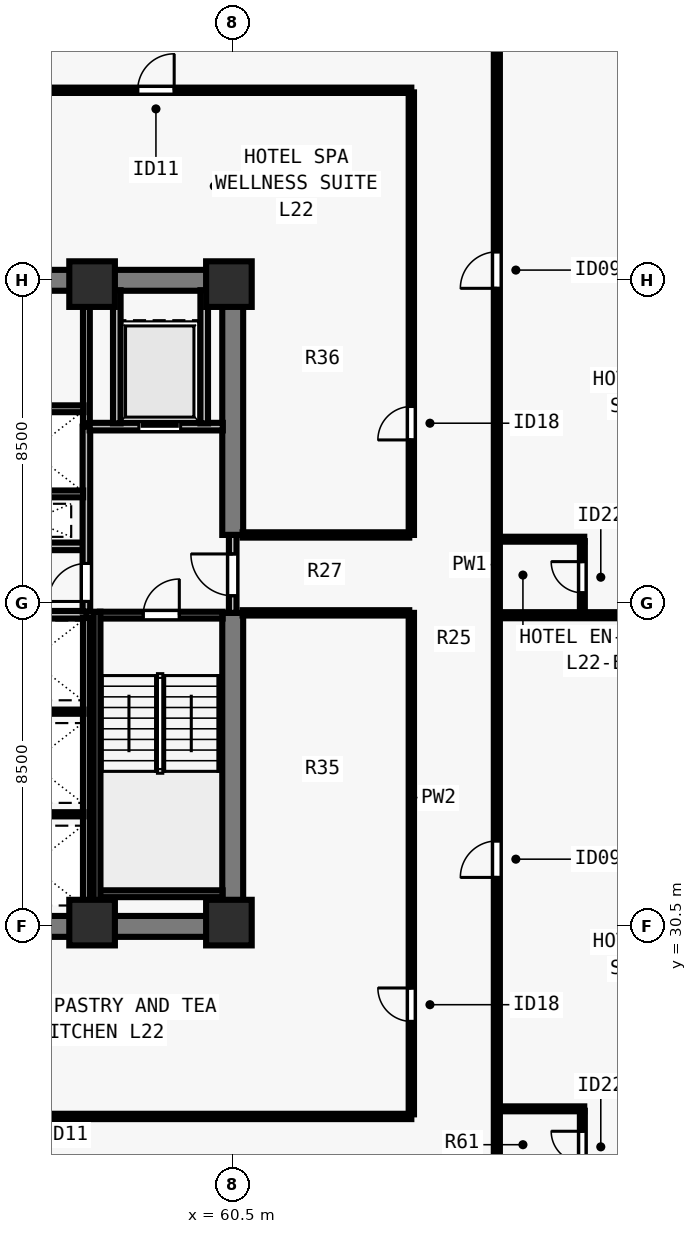
"""IFC4 building model, lengths in metres.
Left out: names, types, materials, properties, quantities, classifications, styles, units other than length and angle.
Written with IfcOpenShell. Run it as: python <this file> out.ifc"""

import sys

from ifc_helpers import new_model, si_unit, direction, frame, frame_2d, origin, origin_2d, place, context, subcontext, project, spatial, rectangle, extrude, element, fill, save


model = new_model("IFC4")
c1 = context("Model", 3, precision=1e-05, world=origin(), true_north=direction((0.0, 1.0)))
c2 = subcontext(c1, "Body", "Model", "MODEL_VIEW")
j1 = project(units=[si_unit("LENGTHUNIT", "METRE"), si_unit("PLANEANGLEUNIT", "RADIAN")], contexts=[c1])
p1 = place(None, origin())
s1 = spatial("IfcSite", under=j1, at=p1, CompositionType="ELEMENT")
p2 = place(p1, origin())
s2 = spatial("IfcBuilding", under=s1, at=p2, CompositionType="ELEMENT")
p3 = place(p2, frame((0.0, 0.0, 83.0)))
s3 = spatial("IfcBuildingStorey", under=s2, at=p3, CompositionType="ELEMENT", Elevation=83.0)
for number, where, z_axis, x_axis in (
    (1, (56.8, 30.6, 0.0), (0.0, 0.0, 1.0), (1.0, 0.0, 0.0)),
    (2, (60.4, 30.6, 0.0), (0.0, 0.0, 1.0), (1.0, 0.0, 0.0)),
    (3, (56.8, 47.4, 0.0), (0.0, 0.0, 1.0), (1.0, 0.0, 0.0)),
    (4, (60.4, 47.4, 0.0), (0.0, 0.0, 1.0), (1.0, 0.0, 0.0)),
):
    element("IfcColumn", number, at=place(p3, frame(where, z_axis=z_axis, x_axis=x_axis)), inside=s3, PredefinedType="COLUMN", context=c2, shape_type="SweptSolid", body=[
        extrude(rectangle(XDim=1.2, YDim=1.2, at=origin_2d()), origin(), (0.0, 0.0, 1.0), 3.5),
    ])
for number, where, z_axis, x_axis in (
    (5, (43.225, 30.5, 0.0), (0.0, 0.0, 1.0), (1.0, 0.0, 0.0)),
    (6, (43.225, 47.5, 0.0), (0.0, 0.0, 1.0), (1.0, 0.0, 0.0)),
):
    element("IfcWall", number, at=place(p3, frame(where, z_axis=z_axis, x_axis=x_axis)), inside=s3, PredefinedType="SHEAR", context=c2, shape_type="SweptSolid", body=[
        extrude(rectangle(XDim=17.55, YDim=0.55, at=frame_2d((8.775, 0.0))), origin(), (0.0, 0.0, 1.0), 3.28),
    ])
p4 = place(p3, frame((60.5, 30.765, 0.0), z_axis=(0.0, 0.0, 1.0), x_axis=(0.0, 1.0, 0.0)))
e7 = element("IfcWall", 7, at=p4, inside=s3, PredefinedType="SHEAR", context=c2, shape_type="SweptSolid", body=[
    extrude(rectangle(XDim=7.985, YDim=0.55, at=frame_2d((3.993, 0.0))), origin(), (0.0, 0.0, 1.0), 3.28),
])
p5 = place(p3, frame((60.5, 40.8, 0.0), z_axis=(0.0, 0.0, 1.0), x_axis=(0.0, 1.0, 0.0)))
e8 = element("IfcWall", 8, at=p5, inside=s3, PredefinedType="SHEAR", context=c2, shape_type="SweptSolid", body=[
    extrude(rectangle(XDim=6.435, YDim=0.55, at=frame_2d((3.218, 0.0))), origin(), (0.0, 0.0, 1.0), 3.28),
])
for number, where, z_axis, x_axis in (
    (9, (53.7, 38.7, 0.0), (0.0, 0.0, 1.0), (1.0, 0.0, 0.0)),
    (10, (53.7, 40.5, 0.0), (0.0, 0.0, 1.0), (1.0, 0.0, 0.0)),
):
    element("IfcWall", number, at=place(p3, frame(where, z_axis=z_axis, x_axis=x_axis)), inside=s3, PredefinedType="SOLIDWALL", context=c2, shape_type="SweptSolid", body=[
        extrude(rectangle(XDim=2.95, YDim=0.2, at=frame_2d((1.475, 0.0))), origin(), (0.0, 0.0, 1.0), 3.28),
    ])
p6 = place(p3, frame((60.5, 38.75, 0.0), z_axis=(0.0, 0.0, 1.0), x_axis=(0.0, 1.0, 0.0)))
e11 = element("IfcWall", 11, at=p6, inside=s3, PredefinedType="SOLIDWALL", context=c2, shape_type="SweptSolid", body=[
    extrude(rectangle(XDim=2.05, YDim=0.2, at=frame_2d((1.025, 0.0))), origin(), (0.0, 0.0, 1.0), 3.28),
])
p7 = place(p6, frame((0.45, 0.0, 0.0)))
e12 = element("IfcOpeningElement", 12, at=p7, cuts=e11, PredefinedType="OPENING", context=c2, shape_type="SweptSolid", body=[
    extrude(rectangle(XDim=1.1, YDim=2.15, at=frame_2d((0.55, 1.075))), frame((0.0, 0.11, 0.0), z_axis=(0.0, -1.0, 0.0), x_axis=(1.0, 0.0, 0.0)), (0.0, 0.0, 1.0), 0.22),
])
p8 = place(p3, frame((56.65, 38.785, 0.0), z_axis=(0.0, 0.0, 1.0), x_axis=(0.0, 1.0, 0.0)))
e13 = element("IfcWall", 13, at=p8, inside=s3, PredefinedType="SOLIDWALL", context=c2, shape_type="SweptSolid", body=[
    extrude(rectangle(XDim=4.865, YDim=0.2, at=frame_2d((2.433, 0.0))), origin(), (0.0, 0.0, 1.0), 3.28),
])
p9 = place(p8, frame((0.265, 0.0, 0.0)))
e14 = element("IfcOpeningElement", 14, at=p9, cuts=e13, PredefinedType="OPENING", context=c2, shape_type="SweptSolid", body=[
    extrude(rectangle(XDim=1.0, YDim=2.15, at=frame_2d((0.5, 1.075))), frame((0.0, 0.11, 0.0), z_axis=(0.0, -1.0, 0.0), x_axis=(1.0, 0.0, 0.0)), (0.0, 0.0, 1.0), 0.22),
])
p10 = place(p3, frame((56.735, 43.65, 0.0), z_axis=(0.0, 0.0, 1.0), x_axis=(1.0, 0.0, 0.0)))
e15 = element("IfcWall", 15, at=p10, inside=s3, PredefinedType="SOLIDWALL", context=c2, shape_type="SweptSolid", body=[
    extrude(rectangle(XDim=3.505, YDim=0.2, at=frame_2d((1.752, 0.0))), origin(), (0.0, 0.0, 1.0), 3.28),
])
p11 = place(p10, frame((1.295, 0.0, 0.0)))
e16 = element("IfcOpeningElement", 16, at=p11, cuts=e15, PredefinedType="OPENING", context=c2, shape_type="SweptSolid", body=[
    extrude(rectangle(XDim=1.1, YDim=2.2, at=frame_2d((0.55, 1.1))), frame((0.0, 0.11, 0.0), z_axis=(0.0, -1.0, 0.0), x_axis=(1.0, 0.0, 0.0)), (0.0, 0.0, 1.0), 0.22),
])
for number, where, z_axis, x_axis in (
    (17, (57.45, 43.735, 0.0), (0.0, 0.0, 1.0), (0.0, 1.0, 0.0)),
    (18, (59.75, 43.735, 0.0), (0.0, 0.0, 1.0), (0.0, 1.0, 0.0)),
):
    element("IfcWall", number, at=place(p3, frame(where, z_axis=z_axis, x_axis=x_axis)), inside=s3, PredefinedType="SOLIDWALL", context=c2, shape_type="SweptSolid", body=[
        extrude(rectangle(XDim=3.505, YDim=0.2, at=frame_2d((1.752, 0.0))), origin(), (0.0, 0.0, 1.0), 3.28),
    ])
p12 = place(p3, frame((56.65, 30.76, 0.0), z_axis=(0.0, 0.0, 1.0), x_axis=(0.0, 1.0, 0.0)))
e19 = element("IfcWall", 19, at=p12, inside=s3, PredefinedType="SOLIDWALL", context=c2, shape_type="SweptSolid", body=[
    extrude(rectangle(XDim=7.855, YDim=0.18, at=frame_2d((3.927, 0.0))), origin(), (0.0, 0.0, 1.0), 3.28),
])
for number, where, z_axis, x_axis in (
    (20, (53.785, 33.45, 0.0), (0.0, 0.0, 1.0), (1.0, 0.0, 0.0)),
    (21, (53.785, 36.15, 0.0), (0.0, 0.0, 1.0), (1.0, 0.0, 0.0)),
):
    element("IfcWall", number, at=place(p3, frame(where, z_axis=z_axis, x_axis=x_axis)), inside=s3, PredefinedType="PARTITIONING", context=c2, shape_type="SweptSolid", body=[
        extrude(rectangle(XDim=2.79, YDim=0.11, at=frame_2d((1.395, 0.0))), origin(), (0.0, 0.0, 1.0), 3.28),
    ])
p13 = place(p3, frame((56.65, 43.735, 0.0), z_axis=(0.0, 0.0, 1.0), x_axis=(0.0, 1.0, 0.0)))
e22 = element("IfcWall", 22, at=p13, inside=s3, PredefinedType="SOLIDWALL", context=c2, shape_type="SweptSolid", body=[
    extrude(rectangle(XDim=3.505, YDim=0.18, at=frame_2d((1.752, 0.0))), origin(), (0.0, 0.0, 1.0), 3.28),
])
p14 = place(p3, frame((53.785, 41.88, 0.0), z_axis=(0.0, 0.0, 1.0), x_axis=(1.0, 0.0, 0.0)))
e23 = element("IfcWall", 23, at=p14, inside=s3, PredefinedType="SOLIDWALL", context=c2, shape_type="SweptSolid", body=[
    extrude(rectangle(XDim=2.78, YDim=0.18, at=frame_2d((1.39, 0.0))), origin(), (0.0, 0.0, 1.0), 3.28),
])
p15 = place(p3, frame((53.785, 44.12, 0.0), z_axis=(0.0, 0.0, 1.0), x_axis=(1.0, 0.0, 0.0)))
e24 = element("IfcWall", 24, at=p15, inside=s3, PredefinedType="SOLIDWALL", context=c2, shape_type="SweptSolid", body=[
    extrude(rectangle(XDim=2.79, YDim=0.18, at=frame_2d((1.395, 0.0))), origin(), (0.0, 0.0, 1.0), 3.28),
])
p16 = place(p3, frame((67.45, 23.315, 0.0), z_axis=(0.0, 0.0, 1.0), x_axis=(0.0, 1.0, 0.0)))
e25 = element("IfcWall", 25, at=p16, inside=s3, PredefinedType="PARTITIONING", context=c2, shape_type="SweptSolid", body=[
    extrude(rectangle(XDim=31.37, YDim=0.16, at=frame_2d((15.685, 0.0))), origin(), (0.0, 0.0, 1.0), 3.28),
])
p17 = place(p16, frame((8.474, 0.0, 0.0)))
e26 = element("IfcOpeningElement", 26, at=p17, cuts=e25, PredefinedType="OPENING", context=c2, shape_type="SweptSolid", body=[
    extrude(rectangle(XDim=0.96, YDim=2.15, at=frame_2d((0.48, 1.075))), frame((0.0, 0.09, 0.0), z_axis=(0.0, -1.0, 0.0), x_axis=(1.0, 0.0, 0.0)), (0.0, 0.0, 1.0), 0.18),
])
p18 = place(p16, frame((23.974, 0.0, 0.0)))
e27 = element("IfcOpeningElement", 27, at=p18, cuts=e25, PredefinedType="OPENING", context=c2, shape_type="SweptSolid", body=[
    extrude(rectangle(XDim=0.96, YDim=2.15, at=frame_2d((0.48, 1.075))), frame((0.0, 0.09, 0.0), z_axis=(0.0, -1.0, 0.0), x_axis=(1.0, 0.0, 0.0)), (0.0, 0.0, 1.0), 0.18),
])
p19 = place(p3, frame((38.8, 25.5, 0.0), z_axis=(0.0, 0.0, 1.0), x_axis=(1.0, 0.0, 0.0)))
e28 = element("IfcWall", 28, at=p19, inside=s3, PredefinedType="PARTITIONING", context=c2, shape_type="SweptSolid", body=[
    extrude(rectangle(XDim=26.4, YDim=0.14, at=frame_2d((13.2, 0.0))), origin(), (0.0, 0.0, 1.0), 3.28),
])
p20 = place(p19, frame((2.2, 0.0, 0.0)))
e29 = element("IfcOpeningElement", 29, at=p20, cuts=e28, PredefinedType="OPENING", context=c2, shape_type="SweptSolid", body=[
    extrude(rectangle(XDim=0.96, YDim=2.12, at=frame_2d((0.48, 1.06))), frame((0.0, 0.08, 0.0), z_axis=(0.0, -1.0, 0.0), x_axis=(1.0, 0.0, 0.0)), (0.0, 0.0, 1.0), 0.16),
])
p21 = place(p19, frame((15.2, 0.0, 0.0)))
e30 = element("IfcOpeningElement", 30, at=p21, cuts=e28, PredefinedType="OPENING", context=c2, shape_type="SweptSolid", body=[
    extrude(rectangle(XDim=0.96, YDim=2.12, at=frame_2d((0.48, 1.06))), frame((0.0, 0.08, 0.0), z_axis=(0.0, -1.0, 0.0), x_axis=(1.0, 0.0, 0.0)), (0.0, 0.0, 1.0), 0.16),
])
p22 = place(p3, frame((38.8, 52.5, 0.0), z_axis=(0.0, 0.0, 1.0), x_axis=(1.0, 0.0, 0.0)))
e31 = element("IfcWall", 31, at=p22, inside=s3, PredefinedType="PARTITIONING", context=c2, shape_type="SweptSolid", body=[
    extrude(rectangle(XDim=26.4, YDim=0.14, at=frame_2d((13.2, 0.0))), origin(), (0.0, 0.0, 1.0), 3.28),
])
p23 = place(p22, frame((3.2, 0.0, 0.0)))
e32 = element("IfcOpeningElement", 32, at=p23, cuts=e31, PredefinedType="OPENING", context=c2, shape_type="SweptSolid", body=[
    extrude(rectangle(XDim=0.96, YDim=2.12, at=frame_2d((0.48, 1.06))), frame((0.0, 0.08, 0.0), z_axis=(0.0, -1.0, 0.0), x_axis=(1.0, 0.0, 0.0)), (0.0, 0.0, 1.0), 0.16),
])
p24 = place(p22, frame((19.2, 0.0, 0.0)))
e33 = element("IfcOpeningElement", 33, at=p24, cuts=e31, PredefinedType="OPENING", context=c2, shape_type="SweptSolid", body=[
    extrude(rectangle(XDim=0.96, YDim=2.12, at=frame_2d((0.48, 1.06))), frame((0.0, 0.08, 0.0), z_axis=(0.0, -1.0, 0.0), x_axis=(1.0, 0.0, 0.0)), (0.0, 0.0, 1.0), 0.16),
])
p25 = place(p3, frame((65.2, 25.555, 0.0), z_axis=(0.0, 0.0, 1.0), x_axis=(0.0, 1.0, 0.0)))
e34 = element("IfcWall", 34, at=p25, inside=s3, PredefinedType="PARTITIONING", context=c2, shape_type="SweptSolid", body=[
    extrude(rectangle(XDim=13.195, YDim=0.14, at=frame_2d((6.598, 0.0))), origin(), (0.0, 0.0, 1.0), 3.28),
])
p26 = place(p25, frame((2.445, 0.0, 0.0)))
e35 = element("IfcOpeningElement", 35, at=p26, cuts=e34, PredefinedType="OPENING", context=c2, shape_type="SweptSolid", body=[
    extrude(rectangle(XDim=0.88, YDim=2.1, at=frame_2d((0.44, 1.05))), frame((0.0, 0.08, 0.0), z_axis=(0.0, -1.0, 0.0), x_axis=(1.0, 0.0, 0.0)), (0.0, 0.0, 1.0), 0.16),
])
p27 = place(p3, frame((65.2, 40.8, 0.0), z_axis=(0.0, 0.0, 1.0), x_axis=(0.0, 1.0, 0.0)))
e36 = element("IfcWall", 36, at=p27, inside=s3, PredefinedType="PARTITIONING", context=c2, shape_type="SweptSolid", body=[
    extrude(rectangle(XDim=11.645, YDim=0.14, at=frame_2d((5.823, 0.0))), origin(), (0.0, 0.0, 1.0), 3.28),
])
p28 = place(p27, frame((2.5, 0.0, 0.0)))
e37 = element("IfcOpeningElement", 37, at=p28, cuts=e36, PredefinedType="OPENING", context=c2, shape_type="SweptSolid", body=[
    extrude(rectangle(XDim=0.88, YDim=2.1, at=frame_2d((0.44, 1.05))), frame((0.0, 0.08, 0.0), z_axis=(0.0, -1.0, 0.0), x_axis=(1.0, 0.0, 0.0)), (0.0, 0.0, 1.0), 0.16),
])
for number, where, z_axis, x_axis in (
    (38, (60.76, 38.75, 0.0), (0.0, 0.0, 1.0), (1.0, 0.0, 0.0)),
    (39, (60.76, 40.8, 0.0), (0.0, 0.0, 1.0), (1.0, 0.0, 0.0)),
):
    element("IfcWall", number, at=place(p3, frame(where, z_axis=z_axis, x_axis=x_axis)), inside=s3, PredefinedType="PARTITIONING", context=c2, shape_type="SweptSolid", body=[
        extrude(rectangle(XDim=4.385, YDim=0.14, at=frame_2d((2.192, 0.0))), origin(), (0.0, 0.0, 1.0), 3.28),
    ])
p29 = place(p3, frame((67.515, 25.7, 0.0), z_axis=(0.0, 0.0, 1.0), x_axis=(1.0, 0.0, 0.0)))
e40 = element("IfcWall", 40, at=p29, inside=s3, PredefinedType="PLUMBINGWALL", context=c2, shape_type="SweptSolid", body=[
    extrude(rectangle(XDim=2.235, YDim=0.13, at=frame_2d((1.118, 0.0))), origin(), (0.0, 0.0, 1.0), 3.28),
])
p30 = place(p3, frame((69.7, 23.75, 0.0), z_axis=(0.0, 0.0, 1.0), x_axis=(0.0, 1.0, 0.0)))
e41 = element("IfcWall", 41, at=p30, inside=s3, PredefinedType="PLUMBINGWALL", context=c2, shape_type="SweptSolid", body=[
    extrude(rectangle(XDim=1.9, YDim=0.13, at=frame_2d((0.95, 0.0))), origin(), (0.0, 0.0, 1.0), 3.28),
])
p31 = place(p30, frame((0.54, 0.0, 0.0)))
e42 = element("IfcOpeningElement", 42, at=p31, cuts=e41, PredefinedType="OPENING", context=c2, shape_type="SweptSolid", body=[
    extrude(rectangle(XDim=0.82, YDim=2.1, at=frame_2d((0.41, 1.05))), frame((0.0, 0.075, 0.0), z_axis=(0.0, -1.0, 0.0), x_axis=(1.0, 0.0, 0.0)), (0.0, 0.0, 1.0), 0.15),
])
p32 = place(p3, frame((67.515, 38.688, 0.0), z_axis=(0.0, 0.0, 1.0), x_axis=(1.0, 0.0, 0.0)))
e43 = element("IfcWall", 43, at=p32, inside=s3, PredefinedType="PARTITIONING", context=c2, shape_type="SweptSolid", body=[
    extrude(rectangle(XDim=9.64, YDim=0.16, at=frame_2d((4.82, 0.0))), origin(), (0.0, 0.0, 1.0), 3.28),
])
p33 = place(p3, frame((67.515, 40.688, 0.0), z_axis=(0.0, 0.0, 1.0), x_axis=(1.0, 0.0, 0.0)))
e44 = element("IfcWall", 44, at=p33, inside=s3, PredefinedType="PLUMBINGWALL", context=c2, shape_type="SweptSolid", body=[
    extrude(rectangle(XDim=2.235, YDim=0.13, at=frame_2d((1.118, 0.0))), origin(), (0.0, 0.0, 1.0), 3.28),
])
p34 = place(p3, frame((69.7, 38.753, 0.0), z_axis=(0.0, 0.0, 1.0), x_axis=(0.0, 1.0, 0.0)))
e45 = element("IfcWall", 45, at=p34, inside=s3, PredefinedType="PLUMBINGWALL", context=c2, shape_type="SweptSolid", body=[
    extrude(rectangle(XDim=1.885, YDim=0.13, at=frame_2d((0.942, 0.0))), origin(), (0.0, 0.0, 1.0), 3.28),
])
p35 = place(p34, frame((0.525, 0.0, 0.0)))
e46 = element("IfcOpeningElement", 46, at=p35, cuts=e45, PredefinedType="OPENING", context=c2, shape_type="SweptSolid", body=[
    extrude(rectangle(XDim=0.82, YDim=2.1, at=frame_2d((0.41, 1.05))), frame((0.0, 0.075, 0.0), z_axis=(0.0, -1.0, 0.0), x_axis=(1.0, 0.0, 0.0)), (0.0, 0.0, 1.0), 0.15),
])
p36 = place(p3, frame((57.005, 38.69, 0.0), z_axis=(0.0, 0.0, 1.0), x_axis=(1.0, 0.0, 0.0)))
e47 = element("IfcWall", 47, at=p36, inside=s3, PredefinedType="SOLIDWALL", context=c2, shape_type="SweptSolid", body=[
    extrude(rectangle(XDim=3.23, YDim=0.18, at=frame_2d((1.615, 0.0))), origin(), (0.0, 0.0, 1.0), 3.28),
])
p37 = place(p36, frame((1.14, 0.0, 0.0)))
e48 = element("IfcOpeningElement", 48, at=p37, cuts=e47, PredefinedType="OPENING", context=c2, shape_type="SweptSolid", body=[
    extrude(rectangle(XDim=0.95, YDim=2.15, at=frame_2d((0.475, 1.075))), frame((0.0, 0.1, 0.0), z_axis=(0.0, -1.0, 0.0), x_axis=(1.0, 0.0, 0.0)), (0.0, 0.0, 1.0), 0.2),
])
p38 = place(p3, frame((57.005, 31.36, 0.0), z_axis=(0.0, 0.0, 1.0), x_axis=(1.0, 0.0, 0.0)))
e49 = element("IfcWall", 49, at=p38, inside=s3, PredefinedType="SOLIDWALL", context=c2, shape_type="SweptSolid", body=[
    extrude(rectangle(XDim=3.23, YDim=0.18, at=frame_2d((1.615, 0.0))), origin(), (0.0, 0.0, 1.0), 3.28),
])
p39 = place(p3, frame((56.93, 38.78, 0.0), z_axis=(0.0, 0.0, 1.0), x_axis=(0.0, -1.0, 0.0)))
e50 = element("IfcWall", 50, at=p39, inside=s3, PredefinedType="SOLIDWALL", context=c2, shape_type="SweptSolid", body=[
    extrude(rectangle(XDim=8.017, YDim=0.18, at=frame_2d((4.009, 0.0))), origin(), (0.0, 0.0, 1.0), 3.28),
])
p40 = place(p7, origin())
e51 = element("IfcDoor", 51, at=p40, inside=s3, OperationType="SINGLE_SWING_RIGHT", PredefinedType="DOOR", context=c2, shape_type="SweptSolid", body=[
    extrude(rectangle(XDim=1.1, YDim=2.15, at=frame_2d((0.55, 1.075))), frame((0.0, 0.025, 0.0), z_axis=(0.0, -1.0, 0.0), x_axis=(1.0, 0.0, 0.0)), (0.0, 0.0, 1.0), 0.05),
])
fill(e12, e51)
p41 = place(p9, origin())
e52 = element("IfcDoor", 52, at=p41, inside=s3, OperationType="SINGLE_SWING_LEFT", PredefinedType="DOOR", context=c2, shape_type="SweptSolid", body=[
    extrude(rectangle(XDim=1.0, YDim=2.15, at=frame_2d((0.5, 1.075))), frame((0.0, 0.025, 0.0), z_axis=(0.0, -1.0, 0.0), x_axis=(1.0, 0.0, 0.0)), (0.0, 0.0, 1.0), 0.05),
])
fill(e14, e52)
p42 = place(p11, origin())
e53 = element("IfcDoor", 53, at=p42, inside=s3, OperationType="SLIDING_TO_LEFT", PredefinedType="DOOR", context=c2, shape_type="SweptSolid", body=[
    extrude(rectangle(XDim=1.1, YDim=2.2, at=frame_2d((0.55, 1.1))), frame((0.0, 0.025, 0.0), z_axis=(0.0, -1.0, 0.0), x_axis=(1.0, 0.0, 0.0)), (0.0, 0.0, 1.0), 0.05),
])
fill(e16, e53)
p43 = place(p24, origin())
e54 = element("IfcDoor", 54, at=p43, inside=s3, OperationType="SINGLE_SWING_RIGHT", PredefinedType="DOOR", context=c2, shape_type="SweptSolid", body=[
    extrude(rectangle(XDim=0.96, YDim=2.12, at=frame_2d((0.48, 1.06))), frame((0.0, 0.025, 0.0), z_axis=(0.0, -1.0, 0.0), x_axis=(1.0, 0.0, 0.0)), (0.0, 0.0, 1.0), 0.05),
])
fill(e33, e54)
p44 = place(p26, origin())
e55 = element("IfcDoor", 55, at=p44, inside=s3, OperationType="SINGLE_SWING_RIGHT", PredefinedType="DOOR", context=c2, shape_type="SweptSolid", body=[
    extrude(rectangle(XDim=0.88, YDim=2.1, at=frame_2d((0.44, 1.05))), frame((0.0, 0.025, 0.0), z_axis=(0.0, -1.0, 0.0), x_axis=(1.0, 0.0, 0.0)), (0.0, 0.0, 1.0), 0.05),
])
fill(e35, e55)
p45 = place(p28, origin())
e56 = element("IfcDoor", 56, at=p45, inside=s3, OperationType="SINGLE_SWING_LEFT", PredefinedType="DOOR", context=c2, shape_type="SweptSolid", body=[
    extrude(rectangle(XDim=0.88, YDim=2.1, at=frame_2d((0.44, 1.05))), frame((0.0, 0.025, 0.0), z_axis=(0.0, -1.0, 0.0), x_axis=(1.0, 0.0, 0.0)), (0.0, 0.0, 1.0), 0.05),
])
fill(e37, e56)
p46 = place(p31, origin())
e57 = element("IfcDoor", 57, at=p46, inside=s3, OperationType="SINGLE_SWING_RIGHT", PredefinedType="DOOR", context=c2, shape_type="SweptSolid", body=[
    extrude(rectangle(XDim=0.82, YDim=2.1, at=frame_2d((0.41, 1.05))), frame((0.0, 0.025, 0.0), z_axis=(0.0, -1.0, 0.0), x_axis=(1.0, 0.0, 0.0)), (0.0, 0.0, 1.0), 0.05),
])
fill(e42, e57)
p47 = place(p17, origin())
e58 = element("IfcDoor", 58, at=p47, inside=s3, OperationType="SINGLE_SWING_LEFT", PredefinedType="DOOR", context=c2, shape_type="SweptSolid", body=[
    extrude(rectangle(XDim=0.96, YDim=2.15, at=frame_2d((0.48, 1.075))), frame((0.0, 0.025, 0.0), z_axis=(0.0, -1.0, 0.0), x_axis=(1.0, 0.0, 0.0)), (0.0, 0.0, 1.0), 0.05),
])
fill(e26, e58)
p48 = place(p35, origin())
e59 = element("IfcDoor", 59, at=p48, inside=s3, OperationType="SINGLE_SWING_RIGHT", PredefinedType="DOOR", context=c2, shape_type="SweptSolid", body=[
    extrude(rectangle(XDim=0.82, YDim=2.1, at=frame_2d((0.41, 1.05))), frame((0.0, 0.025, 0.0), z_axis=(0.0, -1.0, 0.0), x_axis=(1.0, 0.0, 0.0)), (0.0, 0.0, 1.0), 0.05),
])
fill(e46, e59)
p49 = place(p18, origin())
e60 = element("IfcDoor", 60, at=p49, inside=s3, OperationType="SINGLE_SWING_LEFT", PredefinedType="DOOR", context=c2, shape_type="SweptSolid", body=[
    extrude(rectangle(XDim=0.96, YDim=2.15, at=frame_2d((0.48, 1.075))), frame((0.0, 0.025, 0.0), z_axis=(0.0, -1.0, 0.0), x_axis=(1.0, 0.0, 0.0)), (0.0, 0.0, 1.0), 0.05),
])
fill(e27, e60)
p50 = place(p37, origin())
e61 = element("IfcDoor", 61, at=p50, inside=s3, OperationType="SINGLE_SWING_RIGHT", PredefinedType="DOOR", context=c2, shape_type="SweptSolid", body=[
    extrude(rectangle(XDim=0.95, YDim=2.15, at=frame_2d((0.475, 1.075))), frame((0.0, 0.025, 0.0), z_axis=(0.0, -1.0, 0.0), x_axis=(1.0, 0.0, 0.0)), (0.0, 0.0, 1.0), 0.05),
])
fill(e48, e61)
save(model, sys.argv[1])
